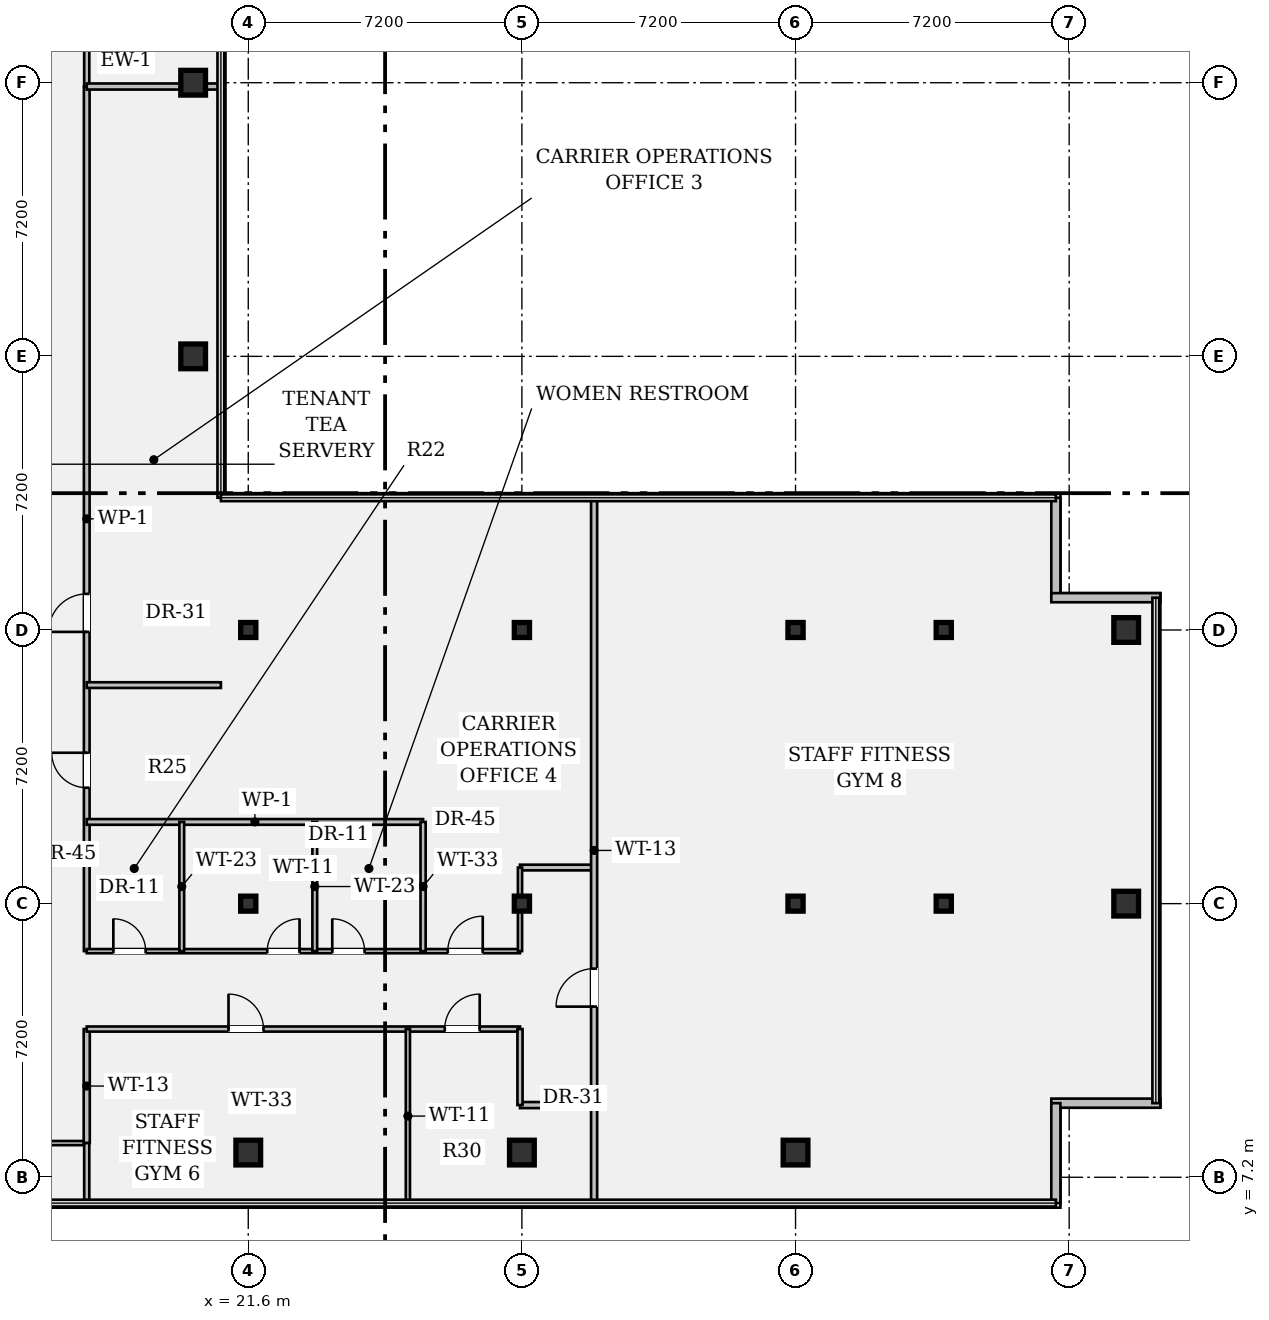
"""IFC4 building model, lengths in metres.
Left out: names, types, materials, properties, quantities, classifications, styles, units other than length and angle.
Written with IfcOpenShell. Run it as: python <this file> out.ifc"""

import sys

from ifc_helpers import new_model, si_unit, direction, frame, frame_2d, origin, origin_2d, place, context, subcontext, project, spatial, rectangle, hollow_rectangle, i_section, extrude, element, fill, save


model = new_model("IFC4")
c1 = context("Model", 3, precision=1e-05, world=origin(), true_north=direction((0.0, 1.0)))
c2 = subcontext(c1, "Body", "Model", "MODEL_VIEW")
j1 = project(units=[si_unit("LENGTHUNIT", "METRE"), si_unit("PLANEANGLEUNIT", "RADIAN")], contexts=[c1])
p1 = place(None, origin())
s1 = spatial("IfcSite", under=j1, at=p1, CompositionType="ELEMENT")
p2 = place(p1, origin())
s2 = spatial("IfcBuilding", under=s1, at=p2, CompositionType="ELEMENT")
p3 = place(p2, frame((0.0, 0.0, 272.65)))
s3 = spatial("IfcBuildingStorey", under=s2, at=p3, CompositionType="ELEMENT", Elevation=272.65)
for number, where, z_axis, x_axis in (
    (1, (20.15, 28.8, 0.0), (0.0, 0.0, 1.0), (1.0, 0.0, 0.0)),
    (2, (20.15, 36.0, 0.0), (0.0, 0.0, 1.0), (1.0, 0.0, 0.0)),
    (3, (21.6, 7.85, 0.0), (0.0, 0.0, 1.0), (1.0, 0.0, 0.0)),
):
    element("IfcColumn", number, at=place(p3, frame(where, z_axis=z_axis, x_axis=x_axis)), inside=s3, PredefinedType="COLUMN", context=c2, shape_type="SweptSolid", body=[
        extrude(hollow_rectangle(XDim=0.65, YDim=0.65, WallThickness=0.04, at=origin_2d()), origin(), (0.0, 0.0, 1.0), 3.24),
    ])
for number, where, z_axis, x_axis in (
    (4, (21.6, 14.4, 0.0), (0.0, 0.0, 1.0), (1.0, 0.0, 0.0)),
    (5, (21.6, 21.6, 0.0), (0.0, 0.0, 1.0), (1.0, 0.0, 0.0)),
):
    element("IfcColumn", number, at=place(p3, frame(where, z_axis=z_axis, x_axis=x_axis)), inside=s3, PredefinedType="COLUMN", context=c2, shape_type="SweptSolid", body=[
        extrude(i_section(OverallWidth=0.399, OverallDepth=0.394, WebThickness=0.023, FlangeThickness=0.037, FilletRadius=0.018, at=origin_2d()), origin(), (0.0, 0.0, 1.0), 3.24),
    ])
p4 = place(p3, frame((28.8, 7.85, 0.0), z_axis=(0.0, 0.0, 1.0), x_axis=(1.0, 0.0, 0.0)))
e6 = element("IfcColumn", 6, at=p4, inside=s3, PredefinedType="COLUMN", context=c2, shape_type="SweptSolid", body=[
    extrude(hollow_rectangle(XDim=0.65, YDim=0.65, WallThickness=0.04, at=origin_2d()), origin(), (0.0, 0.0, 1.0), 3.24),
])
for number, where, z_axis, x_axis in (
    (7, (28.8, 14.4, 0.0), (0.0, 0.0, 1.0), (1.0, 0.0, 0.0)),
    (8, (28.8, 21.6, 0.0), (0.0, 0.0, 1.0), (1.0, 0.0, 0.0)),
):
    element("IfcColumn", number, at=place(p3, frame(where, z_axis=z_axis, x_axis=x_axis)), inside=s3, PredefinedType="COLUMN", context=c2, shape_type="SweptSolid", body=[
        extrude(i_section(OverallWidth=0.399, OverallDepth=0.394, WebThickness=0.023, FlangeThickness=0.037, FilletRadius=0.018, at=origin_2d()), origin(), (0.0, 0.0, 1.0), 3.24),
    ])
p5 = place(p3, frame((36.0, 7.85, 0.0), z_axis=(0.0, 0.0, 1.0), x_axis=(1.0, 0.0, 0.0)))
e9 = element("IfcColumn", 9, at=p5, inside=s3, PredefinedType="COLUMN", context=c2, shape_type="SweptSolid", body=[
    extrude(hollow_rectangle(XDim=0.65, YDim=0.65, WallThickness=0.04, at=origin_2d()), origin(), (0.0, 0.0, 1.0), 3.24),
])
for number, where, z_axis, x_axis in (
    (10, (36.0, 14.4, 0.0), (0.0, 0.0, 1.0), (1.0, 0.0, 0.0)),
    (11, (36.0, 21.6, 0.0), (0.0, 0.0, 1.0), (1.0, 0.0, 0.0)),
    (12, (39.9, 14.4, 0.0), (0.0, 0.0, 1.0), (1.0, 0.0, 0.0)),
    (13, (39.9, 21.6, 0.0), (0.0, 0.0, 1.0), (1.0, 0.0, 0.0)),
):
    element("IfcColumn", number, at=place(p3, frame(where, z_axis=z_axis, x_axis=x_axis)), inside=s3, PredefinedType="COLUMN", context=c2, shape_type="SweptSolid", body=[
        extrude(i_section(OverallWidth=0.399, OverallDepth=0.394, WebThickness=0.023, FlangeThickness=0.037, FilletRadius=0.018, at=origin_2d()), origin(), (0.0, 0.0, 1.0), 3.24),
    ])
for number, where, z_axis, x_axis in (
    (14, (44.7, 14.4, 0.0), (0.0, 0.0, 1.0), (1.0, 0.0, 0.0)),
    (15, (44.7, 21.6, 0.0), (0.0, 0.0, 1.0), (1.0, 0.0, 0.0)),
):
    element("IfcColumn", number, at=place(p3, frame(where, z_axis=z_axis, x_axis=x_axis)), inside=s3, PredefinedType="COLUMN", context=c2, shape_type="SweptSolid", body=[
        extrude(hollow_rectangle(XDim=0.65, YDim=0.65, WallThickness=0.04, at=origin_2d()), origin(), (0.0, 0.0, 1.0), 3.24),
    ])
p6 = place(p3, frame((42.85, 25.08, 0.0), z_axis=(0.0, 0.0, 1.0), x_axis=(0.0, -1.0, 0.0)))
e16 = element("IfcWall", 16, at=p6, inside=s3, PredefinedType="STANDARD", context=c2, shape_type="SweptSolid", body=[
    extrude(rectangle(XDim=2.63, YDim=0.24, at=frame_2d((1.315, 0.0))), origin(), (0.0, 0.0, 1.0), 3.24),
])
for number, where, z_axis, x_axis in (
    (17, (42.73, 22.45, 0.0), (0.0, 0.0, 1.0), (1.0, 0.0, 0.0)),
    (18, (45.6, 9.15, 0.0), (0.0, 0.0, 1.0), (-1.0, 0.0, 0.0)),
):
    element("IfcWall", number, at=place(p3, frame(where, z_axis=z_axis, x_axis=x_axis)), inside=s3, PredefinedType="STANDARD", context=c2, shape_type="SweptSolid", body=[
        extrude(rectangle(XDim=2.87, YDim=0.24, at=frame_2d((1.435, 0.0))), origin(), (0.0, 0.0, 1.0), 3.24),
    ])
p7 = place(p3, frame((42.85, 9.15, 0.0), z_axis=(0.0, 0.0, 1.0), x_axis=(0.0, -1.0, 0.0)))
e19 = element("IfcWall", 19, at=p7, inside=s3, PredefinedType="STANDARD", context=c2, shape_type="SweptSolid", body=[
    extrude(rectangle(XDim=2.63, YDim=0.24, at=frame_2d((1.315, 0.0))), origin(), (0.0, 0.0, 1.0), 3.24),
])
p8 = place(p3, frame((14.4, 8.1, 0.0), z_axis=(0.0, 0.0, 1.0), x_axis=(1.0, 0.0, 0.0)))
e20 = element("IfcWall", 20, at=p8, inside=s3, PredefinedType="PARTITIONING", context=c2, shape_type="SweptSolid", body=[
    extrude(rectangle(XDim=2.95, YDim=0.11, at=frame_2d((1.475, 0.0))), origin(), (0.0, 0.0, 1.0), 3.24),
])
p9 = place(p8, frame((0.95, 0.0, 0.0)))
e21 = element("IfcOpeningElement", 21, at=p9, cuts=e20, PredefinedType="OPENING", context=c2, shape_type="SweptSolid", body=[
    extrude(rectangle(XDim=0.92, YDim=2.15, at=frame_2d((0.46, 1.075))), frame((0.0, 0.067, 0.0), z_axis=(0.0, -1.0, 0.0), x_axis=(1.0, 0.0, 0.0)), (0.0, 0.0, 1.0), 0.134),
])
p10 = place(p3, frame((17.35, 8.1, 0.0), z_axis=(0.0, 0.0, 1.0), x_axis=(0.0, 1.0, 0.0)))
e22 = element("IfcWall", 22, at=p10, inside=s3, PredefinedType="PARTITIONING", context=c2, shape_type="SweptSolid", body=[
    extrude(rectangle(XDim=3.0, YDim=0.16, at=frame_2d((1.5, 0.0))), origin(), (0.0, 0.0, 1.0), 3.24),
])
p11 = place(p3, frame((17.35, 13.15, 0.0), z_axis=(0.0, 0.0, 1.0), x_axis=(0.0, 1.0, 0.0)))
e23 = element("IfcWall", 23, at=p11, inside=s3, PredefinedType="PARTITIONING", context=c2, shape_type="SweptSolid", body=[
    extrude(rectangle(XDim=22.75, YDim=0.15, at=frame_2d((11.375, 0.0))), origin(), (0.0, 0.0, 1.0), 2.676),
])
p12 = place(p11, frame((4.3, 0.0, 0.0)))
e24 = element("IfcOpeningElement", 24, at=p12, cuts=e23, PredefinedType="OPENING", context=c2, shape_type="SweptSolid", body=[
    extrude(rectangle(XDim=0.92, YDim=2.15, at=frame_2d((0.46, 1.075))), frame((0.0, 0.087, 0.0), z_axis=(0.0, -1.0, 0.0), x_axis=(1.0, 0.0, 0.0)), (0.0, 0.0, 1.0), 0.174),
])
p13 = place(p11, frame((8.4, 0.0, 0.0)))
e25 = element("IfcOpeningElement", 25, at=p13, cuts=e23, PredefinedType="OPENING", context=c2, shape_type="SweptSolid", body=[
    extrude(rectangle(XDim=1.0, YDim=2.15, at=frame_2d((0.5, 1.075))), frame((0.0, 0.087, 0.0), z_axis=(0.0, -1.0, 0.0), x_axis=(1.0, 0.0, 0.0)), (0.0, 0.0, 1.0), 0.174),
])
p14 = place(p3, frame((17.35, 11.1, 0.0), z_axis=(0.0, 0.0, 1.0), x_axis=(1.0, 0.0, 0.0)))
e26 = element("IfcWall", 26, at=p14, inside=s3, PredefinedType="PARTITIONING", context=c2, shape_type="SweptSolid", body=[
    extrude(rectangle(XDim=11.4, YDim=0.135, at=frame_2d((5.7, 0.0))), origin(), (0.0, 0.0, 1.0), 2.676),
])
p15 = place(p14, frame((3.73, 0.0, 0.0)))
e27 = element("IfcOpeningElement", 27, at=p15, cuts=e26, PredefinedType="OPENING", context=c2, shape_type="SweptSolid", body=[
    extrude(rectangle(XDim=0.92, YDim=2.15, at=frame_2d((0.46, 1.075))), frame((0.0, 0.08, 0.0), z_axis=(0.0, -1.0, 0.0), x_axis=(1.0, 0.0, 0.0)), (0.0, 0.0, 1.0), 0.159),
])
p16 = place(p14, frame((9.42, 0.0, 0.0)))
e28 = element("IfcOpeningElement", 28, at=p16, cuts=e26, PredefinedType="OPENING", context=c2, shape_type="SweptSolid", body=[
    extrude(rectangle(XDim=0.92, YDim=2.15, at=frame_2d((0.46, 1.075))), frame((0.0, 0.08, 0.0), z_axis=(0.0, -1.0, 0.0), x_axis=(1.0, 0.0, 0.0)), (0.0, 0.0, 1.0), 0.159),
])
p17 = place(p3, frame((17.35, 13.15, 0.0), z_axis=(0.0, 0.0, 1.0), x_axis=(1.0, 0.0, 0.0)))
e29 = element("IfcWall", 29, at=p17, inside=s3, PredefinedType="PARTITIONING", context=c2, shape_type="SweptSolid", body=[
    extrude(rectangle(XDim=11.4, YDim=0.11, at=frame_2d((5.7, 0.0))), origin(), (0.0, 0.0, 1.0), 2.676),
])
p18 = place(p17, frame((0.7, 0.0, 0.0)))
e30 = element("IfcOpeningElement", 30, at=p18, cuts=e29, PredefinedType="OPENING", context=c2, shape_type="SweptSolid", body=[
    extrude(rectangle(XDim=0.85, YDim=2.15, at=frame_2d((0.425, 1.075))), frame((0.0, 0.067, 0.0), z_axis=(0.0, -1.0, 0.0), x_axis=(1.0, 0.0, 0.0)), (0.0, 0.0, 1.0), 0.134),
])
p19 = place(p17, frame((4.75, 0.0, 0.0)))
e31 = element("IfcOpeningElement", 31, at=p19, cuts=e29, PredefinedType="OPENING", context=c2, shape_type="SweptSolid", body=[
    extrude(rectangle(XDim=0.85, YDim=2.15, at=frame_2d((0.425, 1.075))), frame((0.0, 0.067, 0.0), z_axis=(0.0, -1.0, 0.0), x_axis=(1.0, 0.0, 0.0)), (0.0, 0.0, 1.0), 0.134),
])
p20 = place(p17, frame((6.46, 0.0, 0.0)))
e32 = element("IfcOpeningElement", 32, at=p20, cuts=e29, PredefinedType="OPENING", context=c2, shape_type="SweptSolid", body=[
    extrude(rectangle(XDim=0.85, YDim=2.15, at=frame_2d((0.425, 1.075))), frame((0.0, 0.067, 0.0), z_axis=(0.0, -1.0, 0.0), x_axis=(1.0, 0.0, 0.0)), (0.0, 0.0, 1.0), 0.134),
])
p21 = place(p17, frame((9.5, 0.0, 0.0)))
e33 = element("IfcOpeningElement", 33, at=p21, cuts=e29, PredefinedType="OPENING", context=c2, shape_type="SweptSolid", body=[
    extrude(rectangle(XDim=0.92, YDim=2.15, at=frame_2d((0.46, 1.075))), frame((0.0, 0.067, 0.0), z_axis=(0.0, -1.0, 0.0), x_axis=(1.0, 0.0, 0.0)), (0.0, 0.0, 1.0), 0.134),
])
p22 = place(p3, frame((28.75, 9.1, 0.0), z_axis=(0.0, 0.0, 1.0), x_axis=(1.0, 0.0, 0.0)))
e34 = element("IfcWall", 34, at=p22, inside=s3, PredefinedType="PARTITIONING", context=c2, shape_type="SweptSolid", body=[
    extrude(rectangle(XDim=1.95, YDim=0.16, at=frame_2d((0.975, 0.0))), origin(), (0.0, 0.0, 1.0), 2.676),
])
p23 = place(p3, frame((28.75, 15.35, 0.0), z_axis=(0.0, 0.0, 1.0), x_axis=(1.0, 0.0, 0.0)))
e35 = element("IfcWall", 35, at=p23, inside=s3, PredefinedType="PARTITIONING", context=c2, shape_type="SweptSolid", body=[
    extrude(rectangle(XDim=1.95, YDim=0.15, at=frame_2d((0.975, 0.0))), origin(), (0.0, 0.0, 1.0), 2.676),
])
p24 = place(p3, frame((28.75, 9.1, 0.0), z_axis=(0.0, 0.0, 1.0), x_axis=(0.0, 1.0, 0.0)))
e36 = element("IfcWall", 36, at=p24, inside=s3, PredefinedType="PARTITIONING", context=c2, shape_type="SweptSolid", body=[
    extrude(rectangle(XDim=2.0, YDim=0.135, at=frame_2d((1.0, 0.0))), origin(), (0.0, 0.0, 1.0), 2.676),
])
p25 = place(p3, frame((28.75, 13.15, 0.0), z_axis=(0.0, 0.0, 1.0), x_axis=(0.0, 1.0, 0.0)))
e37 = element("IfcWall", 37, at=p25, inside=s3, PredefinedType="PARTITIONING", context=c2, shape_type="SweptSolid", body=[
    extrude(rectangle(XDim=2.2, YDim=0.11, at=frame_2d((1.1, 0.0))), origin(), (0.0, 0.0, 1.0), 2.676),
])
p26 = place(p3, frame((30.7, 6.52, 0.0), z_axis=(0.0, 0.0, 1.0), x_axis=(0.0, 1.0, 0.0)))
e38 = element("IfcWall", 38, at=p26, inside=s3, PredefinedType="PARTITIONING", context=c2, shape_type="SweptSolid", body=[
    extrude(rectangle(XDim=18.56, YDim=0.16, at=frame_2d((9.28, 0.0))), origin(), (0.0, 0.0, 1.0), 2.676),
])
p27 = place(p26, frame((5.17, 0.0, 0.0)))
e39 = element("IfcOpeningElement", 39, at=p27, cuts=e38, PredefinedType="OPENING", context=c2, shape_type="SweptSolid", body=[
    extrude(rectangle(XDim=1.0, YDim=2.15, at=frame_2d((0.5, 1.075))), frame((0.0, 0.092, 0.0), z_axis=(0.0, -1.0, 0.0), x_axis=(1.0, 0.0, 0.0)), (0.0, 0.0, 1.0), 0.184),
])
p28 = place(p3, frame((17.35, 35.9, 0.0), z_axis=(0.0, 0.0, 1.0), x_axis=(0.0, 1.0, 0.0)))
e40 = element("IfcWall", 40, at=p28, inside=s3, PredefinedType="PARTITIONING", context=c2, shape_type="SweptSolid", body=[
    extrude(rectangle(XDim=2.4, YDim=0.135, at=frame_2d((1.2, 0.0))), origin(), (0.0, 0.0, 1.0), 2.676),
])
p29 = place(p3, frame((17.35, 35.9, 0.0), z_axis=(0.0, 0.0, 1.0), x_axis=(1.0, 0.0, 0.0)))
e41 = element("IfcWall", 41, at=p29, inside=s3, PredefinedType="PARTITIONING", context=c2, shape_type="SweptSolid", body=[
    extrude(rectangle(XDim=3.53, YDim=0.16, at=frame_2d((1.765, 0.0))), origin(), (0.0, 0.0, 1.0), 2.676),
])
p30 = place(p3, frame((17.35, 16.55, 0.0), z_axis=(0.0, 0.0, 1.0), x_axis=(1.0, 0.0, 0.0)))
e42 = element("IfcWall", 42, at=p30, inside=s3, PredefinedType="PARTITIONING", context=c2, shape_type="SweptSolid", body=[
    extrude(rectangle(XDim=8.85, YDim=0.15, at=frame_2d((4.425, 0.0))), origin(), (0.0, 0.0, 1.0), 2.676),
])
p31 = place(p3, frame((26.2, 13.15, 0.0), z_axis=(0.0, 0.0, 1.0), x_axis=(0.0, 1.0, 0.0)))
e43 = element("IfcWall", 43, at=p31, inside=s3, PredefinedType="PARTITIONING", context=c2, shape_type="SweptSolid", body=[
    extrude(rectangle(XDim=3.4, YDim=0.135, at=frame_2d((1.7, 0.0))), origin(), (0.0, 0.0, 1.0), 2.676),
])
for number, where, z_axis, x_axis in (
    (44, (19.85, 13.15, 0.0), (0.0, 0.0, 1.0), (0.0, 1.0, 0.0)),
    (45, (23.35, 13.15, 0.0), (0.0, 0.0, 1.0), (0.0, 1.0, 0.0)),
):
    element("IfcWall", number, at=place(p3, frame(where, z_axis=z_axis, x_axis=x_axis)), inside=s3, PredefinedType="PARTITIONING", context=c2, shape_type="SweptSolid", body=[
        extrude(rectangle(XDim=3.4, YDim=0.125, at=frame_2d((1.7, 0.0))), origin(), (0.0, 0.0, 1.0), 2.676),
    ])
p32 = place(p3, frame((17.35, 20.15, 0.0), z_axis=(0.0, 0.0, 1.0), x_axis=(1.0, 0.0, 0.0)))
e46 = element("IfcWall", 46, at=p32, inside=s3, PredefinedType="PARTITIONING", context=c2, shape_type="SweptSolid", body=[
    extrude(rectangle(XDim=3.53, YDim=0.15, at=frame_2d((1.765, 0.0))), origin(), (0.0, 0.0, 1.0), 2.808),
])
p33 = place(p3, frame((17.35, 6.52, 0.0), z_axis=(0.0, 0.0, 1.0), x_axis=(0.0, 1.0, 0.0)))
e47 = element("IfcWall", 47, at=p33, inside=s3, PredefinedType="PARTITIONING", context=c2, shape_type="SweptSolid", body=[
    extrude(rectangle(XDim=1.58, YDim=0.135, at=frame_2d((0.79, 0.0))), origin(), (0.0, 0.0, 1.0), 3.24),
])
p34 = place(p3, frame((25.8, 6.52, 0.0), z_axis=(0.0, 0.0, 1.0), x_axis=(0.0, 1.0, 0.0)))
e48 = element("IfcWall", 48, at=p34, inside=s3, PredefinedType="PARTITIONING", context=c2, shape_type="SweptSolid", body=[
    extrude(rectangle(XDim=4.58, YDim=0.11, at=frame_2d((2.29, 0.0))), origin(), (0.0, 0.0, 1.0), 2.676),
])
p35 = place(p18, origin())
e49 = element("IfcDoor", 49, at=p35, inside=s3, OperationType="SINGLE_SWING_LEFT", PredefinedType="DOOR", context=c2, shape_type="SweptSolid", body=[
    extrude(rectangle(XDim=0.85, YDim=2.15, at=frame_2d((0.425, 1.075))), frame((0.0, 0.025, 0.0), z_axis=(0.0, -1.0, 0.0), x_axis=(1.0, 0.0, 0.0)), (0.0, 0.0, 1.0), 0.05),
])
fill(e30, e49)
p36 = place(p19, origin())
e50 = element("IfcDoor", 50, at=p36, inside=s3, OperationType="SINGLE_SWING_RIGHT", PredefinedType="DOOR", context=c2, shape_type="SweptSolid", body=[
    extrude(rectangle(XDim=0.85, YDim=2.15, at=frame_2d((0.425, 1.075))), frame((0.0, 0.025, 0.0), z_axis=(0.0, -1.0, 0.0), x_axis=(1.0, 0.0, 0.0)), (0.0, 0.0, 1.0), 0.05),
])
fill(e31, e50)
p37 = place(p20, origin())
e51 = element("IfcDoor", 51, at=p37, inside=s3, OperationType="SINGLE_SWING_LEFT", PredefinedType="DOOR", context=c2, shape_type="SweptSolid", body=[
    extrude(rectangle(XDim=0.85, YDim=2.15, at=frame_2d((0.425, 1.075))), frame((0.0, 0.025, 0.0), z_axis=(0.0, -1.0, 0.0), x_axis=(1.0, 0.0, 0.0)), (0.0, 0.0, 1.0), 0.05),
])
fill(e32, e51)
p38 = place(p12, origin())
e52 = element("IfcDoor", 52, at=p38, inside=s3, OperationType="SINGLE_SWING_RIGHT", PredefinedType="DOOR", context=c2, shape_type="SweptSolid", body=[
    extrude(rectangle(XDim=0.92, YDim=2.15, at=frame_2d((0.46, 1.075))), frame((0.0, 0.025, 0.0), z_axis=(0.0, -1.0, 0.0), x_axis=(1.0, 0.0, 0.0)), (0.0, 0.0, 1.0), 0.05),
])
fill(e24, e52)
p39 = place(p13, origin())
e53 = element("IfcDoor", 53, at=p39, inside=s3, OperationType="SINGLE_SWING_LEFT", PredefinedType="DOOR", context=c2, shape_type="SweptSolid", body=[
    extrude(rectangle(XDim=1.0, YDim=2.15, at=frame_2d((0.5, 1.075))), frame((0.0, 0.025, 0.0), z_axis=(0.0, -1.0, 0.0), x_axis=(1.0, 0.0, 0.0)), (0.0, 0.0, 1.0), 0.05),
])
fill(e25, e53)
p40 = place(p21, origin())
e54 = element("IfcDoor", 54, at=p40, inside=s3, OperationType="SINGLE_SWING_RIGHT", PredefinedType="DOOR", context=c2, shape_type="SweptSolid", body=[
    extrude(rectangle(XDim=0.92, YDim=2.15, at=frame_2d((0.46, 1.075))), frame((0.0, 0.025, 0.0), z_axis=(0.0, -1.0, 0.0), x_axis=(1.0, 0.0, 0.0)), (0.0, 0.0, 1.0), 0.05),
])
fill(e33, e54)
p41 = place(p15, origin())
e55 = element("IfcDoor", 55, at=p41, inside=s3, OperationType="SINGLE_SWING_LEFT", PredefinedType="DOOR", context=c2, shape_type="SweptSolid", body=[
    extrude(rectangle(XDim=0.92, YDim=2.15, at=frame_2d((0.46, 1.075))), frame((0.0, 0.025, 0.0), z_axis=(0.0, -1.0, 0.0), x_axis=(1.0, 0.0, 0.0)), (0.0, 0.0, 1.0), 0.05),
])
fill(e27, e55)
p42 = place(p16, origin())
e56 = element("IfcDoor", 56, at=p42, inside=s3, OperationType="SINGLE_SWING_RIGHT", PredefinedType="DOOR", context=c2, shape_type="SweptSolid", body=[
    extrude(rectangle(XDim=0.92, YDim=2.15, at=frame_2d((0.46, 1.075))), frame((0.0, 0.025, 0.0), z_axis=(0.0, -1.0, 0.0), x_axis=(1.0, 0.0, 0.0)), (0.0, 0.0, 1.0), 0.05),
])
fill(e28, e56)
p43 = place(p27, origin())
e57 = element("IfcDoor", 57, at=p43, inside=s3, OperationType="SINGLE_SWING_LEFT", PredefinedType="DOOR", context=c2, shape_type="SweptSolid", body=[
    extrude(rectangle(XDim=1.0, YDim=2.15, at=frame_2d((0.5, 1.075))), frame((0.0, 0.025, 0.0), z_axis=(0.0, -1.0, 0.0), x_axis=(1.0, 0.0, 0.0)), (0.0, 0.0, 1.0), 0.05),
])
fill(e39, e57)
save(model, sys.argv[1])
